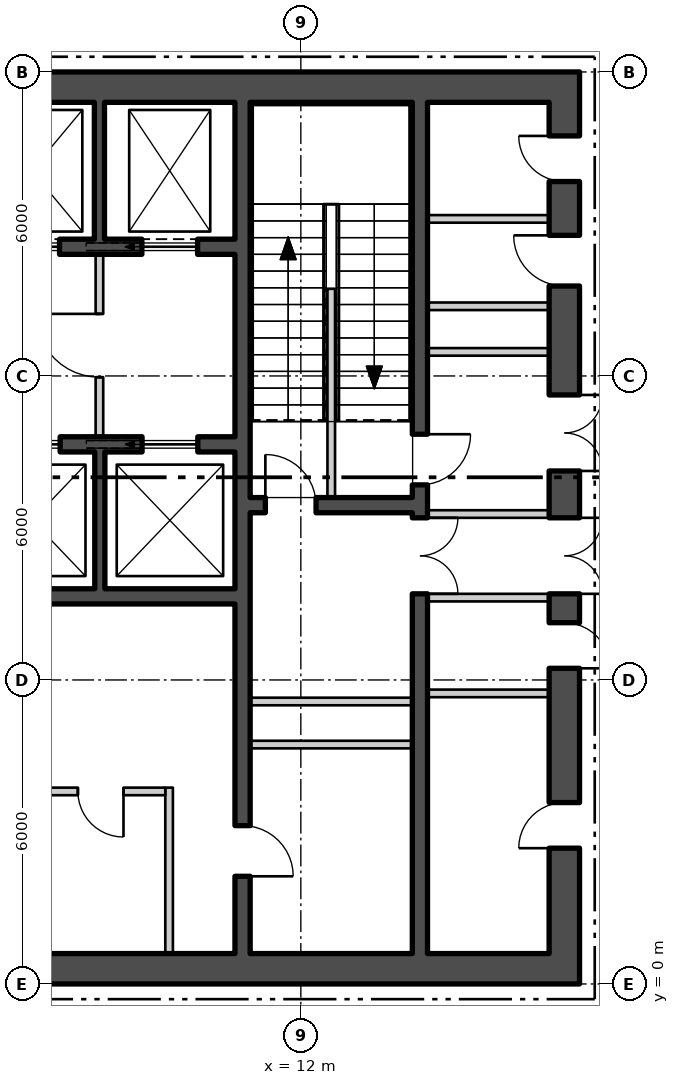
"""IFC4 building model, lengths in metres.
Left out: names, types, materials, properties, quantities, classifications, styles, units other than length and angle.
Written with IfcOpenShell. Run it as: python <this file> out.ifc"""

import sys

from ifc_helpers import new_model, si_unit, direction, frame, frame_2d, origin, place, context, subcontext, project, spatial, rectangle, extrude, element, fill, save


model = new_model("IFC4")
c1 = context("Model", 3, precision=1e-05, world=origin(), true_north=direction((0.0, 1.0)))
c2 = subcontext(c1, "Body", "Model", "MODEL_VIEW")
j1 = project(units=[si_unit("LENGTHUNIT", "METRE"), si_unit("PLANEANGLEUNIT", "RADIAN")], contexts=[c1])
p1 = place(None, origin())
s1 = spatial("IfcSite", under=j1, at=p1, CompositionType="ELEMENT")
p2 = place(p1, origin())
s2 = spatial("IfcBuilding", under=s1, at=p2, CompositionType="ELEMENT")
p3 = place(p2, origin())
s3 = spatial("IfcBuildingStorey", under=s2, at=p3, CompositionType="ELEMENT", Elevation=0.0)
p4 = place(p3, frame((-17.5, 0.3, 0.0), z_axis=(0.0, 0.0, 1.0), x_axis=(1.0, 0.0, 0.0)))
e1 = element("IfcWall", 1, at=p4, inside=s3, PredefinedType="SHEAR", context=c2, shape_type="SweptSolid", body=[
    extrude(rectangle(XDim=35.0, YDim=0.6, at=frame_2d((17.5, 0.0))), origin(), (0.0, 0.0, 1.0), 8.18),
])
p5 = place(p4, frame((12.0, 0.0, 0.0)))
e2 = element("IfcOpeningElement", 2, at=p5, cuts=e1, PredefinedType="OPENING", context=c2, shape_type="SweptSolid", body=[
    extrude(rectangle(XDim=1.8, YDim=2.4, at=frame_2d((0.9, 1.2))), frame((0.0, 0.31, 0.0), z_axis=(0.0, -1.0, 0.0), x_axis=(1.0, 0.0, 0.0)), (0.0, 0.0, 1.0), 0.62),
])
p6 = place(p4, frame((22.0, 0.0, 0.0)))
e3 = element("IfcOpeningElement", 3, at=p6, cuts=e1, PredefinedType="OPENING", context=c2, shape_type="SweptSolid", body=[
    extrude(rectangle(XDim=1.8, YDim=2.4, at=frame_2d((0.9, 1.2))), frame((0.0, 0.31, 0.0), z_axis=(0.0, -1.0, 0.0), x_axis=(1.0, 0.0, 0.0)), (0.0, 0.0, 1.0), 0.62),
])
p7 = place(p3, frame((-17.5, 17.7, 0.0), z_axis=(0.0, 0.0, 1.0), x_axis=(1.0, 0.0, 0.0)))
e4 = element("IfcWall", 4, at=p7, inside=s3, PredefinedType="SHEAR", context=c2, shape_type="SweptSolid", body=[
    extrude(rectangle(XDim=35.0, YDim=0.6, at=frame_2d((17.5, 0.0))), origin(), (0.0, 0.0, 1.0), 8.18),
])
p8 = place(p3, frame((17.2, 0.6, 0.0), z_axis=(0.0, 0.0, 1.0), x_axis=(0.0, 1.0, 0.0)))
e5 = element("IfcWall", 5, at=p8, inside=s3, PredefinedType="SHEAR", context=c2, shape_type="SweptSolid", body=[
    extrude(rectangle(XDim=16.8, YDim=0.6, at=frame_2d((8.4, 0.0))), origin(), (0.0, 0.0, 1.0), 8.18),
])
p9 = place(p8, frame((7.1, 0.0, 0.0)))
e6 = element("IfcOpeningElement", 6, at=p9, cuts=e5, PredefinedType="OPENING", context=c2, shape_type="SweptSolid", body=[
    extrude(rectangle(XDim=1.5, YDim=2.4, at=frame_2d((0.75, 1.2))), frame((0.0, 0.31, 0.0), z_axis=(0.0, -1.0, 0.0), x_axis=(1.0, 0.0, 0.0)), (0.0, 0.0, 1.0), 0.62),
])
p10 = place(p8, frame((9.525, 0.0, 0.0)))
e7 = element("IfcOpeningElement", 7, at=p10, cuts=e5, PredefinedType="OPENING", context=c2, shape_type="SweptSolid", body=[
    extrude(rectangle(XDim=1.5, YDim=2.4, at=frame_2d((0.75, 1.2))), frame((0.0, 0.31, 0.0), z_axis=(0.0, -1.0, 0.0), x_axis=(1.0, 0.0, 0.0)), (0.0, 0.0, 1.0), 0.62),
])
p11 = place(p8, frame((2.08, 0.0, 0.0)))
e8 = element("IfcOpeningElement", 8, at=p11, cuts=e5, PredefinedType="OPENING", context=c2, shape_type="SweptSolid", body=[
    extrude(rectangle(XDim=0.9, YDim=2.1, at=frame_2d((0.45, 1.05))), frame((0.0, 0.31, 0.0), z_axis=(0.0, -1.0, 0.0), x_axis=(1.0, 0.0, 0.0)), (0.0, 0.0, 1.0), 0.62),
])
p12 = place(p8, frame((5.63, 0.0, 0.0)))
e9 = element("IfcOpeningElement", 9, at=p12, cuts=e5, PredefinedType="OPENING", context=c2, shape_type="SweptSolid", body=[
    extrude(rectangle(XDim=0.9, YDim=2.1, at=frame_2d((0.45, 1.05))), frame((0.0, 0.31, 0.0), z_axis=(0.0, -1.0, 0.0), x_axis=(1.0, 0.0, 0.0)), (0.0, 0.0, 1.0), 0.62),
])
p13 = place(p8, frame((13.175, 0.0, 0.0)))
e10 = element("IfcOpeningElement", 10, at=p13, cuts=e5, PredefinedType="OPENING", context=c2, shape_type="SweptSolid", body=[
    extrude(rectangle(XDim=1.0, YDim=2.1, at=frame_2d((0.5, 1.05))), frame((0.0, 0.31, 0.0), z_axis=(0.0, -1.0, 0.0), x_axis=(1.0, 0.0, 0.0)), (0.0, 0.0, 1.0), 0.62),
])
p14 = place(p8, frame((15.238, 0.0, 0.0)))
e11 = element("IfcOpeningElement", 11, at=p14, cuts=e5, PredefinedType="OPENING", context=c2, shape_type="SweptSolid", body=[
    extrude(rectangle(XDim=0.9, YDim=2.1, at=frame_2d((0.45, 1.05))), frame((0.0, 0.31, 0.0), z_axis=(0.0, -1.0, 0.0), x_axis=(1.0, 0.0, 0.0)), (0.0, 0.0, 1.0), 0.62),
])
p15 = place(p3, frame((10.85, 0.6, 0.0), z_axis=(0.0, 0.0, 1.0), x_axis=(0.0, 1.0, 0.0)))
e12 = element("IfcWall", 12, at=p15, inside=s3, PredefinedType="SHEAR", context=c2, shape_type="SweptSolid", body=[
    extrude(rectangle(XDim=16.8, YDim=0.3, at=frame_2d((8.4, 0.0))), origin(), (0.0, 0.0, 1.0), 8.18),
])
p16 = place(p15, frame((1.525, 0.0, 0.0)))
e13 = element("IfcOpeningElement", 13, at=p16, cuts=e12, PredefinedType="OPENING", context=c2, shape_type="SweptSolid", body=[
    extrude(rectangle(XDim=1.0, YDim=2.1, at=frame_2d((0.5, 1.05))), frame((0.0, 0.16, 0.0), z_axis=(0.0, -1.0, 0.0), x_axis=(1.0, 0.0, 0.0)), (0.0, 0.0, 1.0), 0.32),
])
p17 = place(p3, frame((14.35, 0.6, 0.0), z_axis=(0.0, 0.0, 1.0), x_axis=(0.0, 1.0, 0.0)))
e14 = element("IfcWall", 14, at=p17, inside=s3, PredefinedType="SHEAR", context=c2, shape_type="SweptSolid", body=[
    extrude(rectangle(XDim=16.8, YDim=0.3, at=frame_2d((8.4, 0.0))), origin(), (0.0, 0.0, 1.0), 8.18),
])
p18 = place(p17, frame((9.25, 0.0, 0.0)))
e15 = element("IfcOpeningElement", 15, at=p18, cuts=e14, PredefinedType="OPENING", context=c2, shape_type="SweptSolid", body=[
    extrude(rectangle(XDim=1.0, YDim=2.1, at=frame_2d((0.5, 1.05))), frame((0.0, 0.16, 0.0), z_axis=(0.0, -1.0, 0.0), x_axis=(1.0, 0.0, 0.0)), (0.0, 0.0, 1.0), 0.32),
])
p19 = place(p17, frame((7.1, 0.0, 0.0)))
e16 = element("IfcOpeningElement", 16, at=p19, cuts=e14, PredefinedType="OPENING", context=c2, shape_type="SweptSolid", body=[
    extrude(rectangle(XDim=1.5, YDim=2.4, at=frame_2d((0.75, 1.2))), frame((0.0, 0.16, 0.0), z_axis=(0.0, -1.0, 0.0), x_axis=(1.0, 0.0, 0.0)), (0.0, 0.0, 1.0), 0.32),
])
p20 = place(p3, frame((11.0, 9.45, 0.0), z_axis=(0.0, 0.0, 1.0), x_axis=(1.0, 0.0, 0.0)))
e17 = element("IfcWall", 17, at=p20, inside=s3, PredefinedType="SHEAR", context=c2, shape_type="SweptSolid", body=[
    extrude(rectangle(XDim=3.2, YDim=0.3, at=frame_2d((1.6, 0.0))), origin(), (0.0, 0.0, 1.0), 8.18),
])
p21 = place(p20, frame((0.3, 0.0, 0.0)))
e18 = element("IfcOpeningElement", 18, at=p21, cuts=e17, PredefinedType="OPENING", context=c2, shape_type="SweptSolid", body=[
    extrude(rectangle(XDim=1.0, YDim=2.1, at=frame_2d((0.5, 1.05))), frame((0.0, 0.16, 0.0), z_axis=(0.0, -1.0, 0.0), x_axis=(1.0, 0.0, 0.0)), (0.0, 0.0, 1.0), 0.32),
])
p22 = place(p3, frame((-10.7, 14.55, 0.0), z_axis=(0.0, 0.0, 1.0), x_axis=(1.0, 0.0, 0.0)))
e19 = element("IfcWall", 19, at=p22, inside=s3, PredefinedType="SHEAR", context=c2, shape_type="SweptSolid", body=[
    extrude(rectangle(XDim=21.4, YDim=0.3, at=frame_2d((10.7, 0.0))), origin(), (0.0, 0.0, 1.0), 8.18),
])
p23 = place(p22, frame((0.738, 0.0, 0.0)))
e20 = element("IfcOpeningElement", 20, at=p23, cuts=e19, PredefinedType="OPENING", context=c2, shape_type="SweptSolid", body=[
    extrude(rectangle(XDim=1.1, YDim=2.1, at=frame_2d((0.55, 1.05))), frame((0.0, 0.16, 0.0), z_axis=(0.0, -1.0, 0.0), x_axis=(1.0, 0.0, 0.0)), (0.0, 0.0, 1.0), 0.32),
])
p24 = place(p22, frame((3.462, 0.0, 0.0)))
e21 = element("IfcOpeningElement", 21, at=p24, cuts=e19, PredefinedType="OPENING", context=c2, shape_type="SweptSolid", body=[
    extrude(rectangle(XDim=1.1, YDim=2.1, at=frame_2d((0.55, 1.05))), frame((0.0, 0.16, 0.0), z_axis=(0.0, -1.0, 0.0), x_axis=(1.0, 0.0, 0.0)), (0.0, 0.0, 1.0), 0.32),
])
p25 = place(p22, frame((6.138, 0.0, 0.0)))
e22 = element("IfcOpeningElement", 22, at=p25, cuts=e19, PredefinedType="OPENING", context=c2, shape_type="SweptSolid", body=[
    extrude(rectangle(XDim=1.1, YDim=2.1, at=frame_2d((0.55, 1.05))), frame((0.0, 0.16, 0.0), z_axis=(0.0, -1.0, 0.0), x_axis=(1.0, 0.0, 0.0)), (0.0, 0.0, 1.0), 0.32),
])
p26 = place(p22, frame((8.812, 0.0, 0.0)))
e23 = element("IfcOpeningElement", 23, at=p26, cuts=e19, PredefinedType="OPENING", context=c2, shape_type="SweptSolid", body=[
    extrude(rectangle(XDim=1.1, YDim=2.1, at=frame_2d((0.55, 1.05))), frame((0.0, 0.16, 0.0), z_axis=(0.0, -1.0, 0.0), x_axis=(1.0, 0.0, 0.0)), (0.0, 0.0, 1.0), 0.32),
])
p27 = place(p22, frame((11.488, 0.0, 0.0)))
e24 = element("IfcOpeningElement", 24, at=p27, cuts=e19, PredefinedType="OPENING", context=c2, shape_type="SweptSolid", body=[
    extrude(rectangle(XDim=1.1, YDim=2.1, at=frame_2d((0.55, 1.05))), frame((0.0, 0.16, 0.0), z_axis=(0.0, -1.0, 0.0), x_axis=(1.0, 0.0, 0.0)), (0.0, 0.0, 1.0), 0.32),
])
p28 = place(p22, frame((14.162, 0.0, 0.0)))
e25 = element("IfcOpeningElement", 25, at=p28, cuts=e19, PredefinedType="OPENING", context=c2, shape_type="SweptSolid", body=[
    extrude(rectangle(XDim=1.1, YDim=2.1, at=frame_2d((0.55, 1.05))), frame((0.0, 0.16, 0.0), z_axis=(0.0, -1.0, 0.0), x_axis=(1.0, 0.0, 0.0)), (0.0, 0.0, 1.0), 0.32),
])
p29 = place(p22, frame((16.837, 0.0, 0.0)))
e26 = element("IfcOpeningElement", 26, at=p29, cuts=e19, PredefinedType="OPENING", context=c2, shape_type="SweptSolid", body=[
    extrude(rectangle(XDim=1.1, YDim=2.1, at=frame_2d((0.55, 1.05))), frame((0.0, 0.16, 0.0), z_axis=(0.0, -1.0, 0.0), x_axis=(1.0, 0.0, 0.0)), (0.0, 0.0, 1.0), 0.32),
])
p30 = place(p22, frame((19.562, 0.0, 0.0)))
e27 = element("IfcOpeningElement", 27, at=p30, cuts=e19, PredefinedType="OPENING", context=c2, shape_type="SweptSolid", body=[
    extrude(rectangle(XDim=1.1, YDim=2.1, at=frame_2d((0.55, 1.05))), frame((0.0, 0.16, 0.0), z_axis=(0.0, -1.0, 0.0), x_axis=(1.0, 0.0, 0.0)), (0.0, 0.0, 1.0), 0.32),
])
p31 = place(p3, frame((2.6, 10.65, 0.0), z_axis=(0.0, 0.0, 1.0), x_axis=(1.0, 0.0, 0.0)))
e28 = element("IfcWall", 28, at=p31, inside=s3, PredefinedType="SHEAR", context=c2, shape_type="SweptSolid", body=[
    extrude(rectangle(XDim=8.1, YDim=0.3, at=frame_2d((4.05, 0.0))), origin(), (0.0, 0.0, 1.0), 8.18),
])
p32 = place(p31, frame((0.883, 0.0, 0.0)))
e29 = element("IfcOpeningElement", 29, at=p32, cuts=e28, PredefinedType="OPENING", context=c2, shape_type="SweptSolid", body=[
    extrude(rectangle(XDim=1.1, YDim=2.1, at=frame_2d((0.55, 1.05))), frame((0.0, 0.16, 0.0), z_axis=(0.0, -1.0, 0.0), x_axis=(1.0, 0.0, 0.0)), (0.0, 0.0, 1.0), 0.32),
])
p33 = place(p31, frame((3.55, 0.0, 0.0)))
e30 = element("IfcOpeningElement", 30, at=p33, cuts=e28, PredefinedType="OPENING", context=c2, shape_type="SweptSolid", body=[
    extrude(rectangle(XDim=1.1, YDim=2.1, at=frame_2d((0.55, 1.05))), frame((0.0, 0.16, 0.0), z_axis=(0.0, -1.0, 0.0), x_axis=(1.0, 0.0, 0.0)), (0.0, 0.0, 1.0), 0.32),
])
p34 = place(p31, frame((6.267, 0.0, 0.0)))
e31 = element("IfcOpeningElement", 31, at=p34, cuts=e28, PredefinedType="OPENING", context=c2, shape_type="SweptSolid", body=[
    extrude(rectangle(XDim=1.1, YDim=2.1, at=frame_2d((0.55, 1.05))), frame((0.0, 0.16, 0.0), z_axis=(0.0, -1.0, 0.0), x_axis=(1.0, 0.0, 0.0)), (0.0, 0.0, 1.0), 0.32),
])
p35 = place(p3, frame((2.6, 7.65, 0.0), z_axis=(0.0, 0.0, 1.0), x_axis=(1.0, 0.0, 0.0)))
e32 = element("IfcWall", 32, at=p35, inside=s3, PredefinedType="SHEAR", context=c2, shape_type="SweptSolid", body=[
    extrude(rectangle(XDim=8.1, YDim=0.3, at=frame_2d((4.05, 0.0))), origin(), (0.0, 0.0, 1.0), 8.18),
])
for number, where, z_axis, x_axis in (
    (33, (8.025, 14.7, 0.0), (0.0, 0.0, 1.0), (0.0, 1.0, 0.0)),
    (34, (8.033, 7.8, 0.0), (0.0, 0.0, 1.0), (0.0, 1.0, 0.0)),
):
    element("IfcWall", number, at=place(p3, frame(where, z_axis=z_axis, x_axis=x_axis)), inside=s3, PredefinedType="SHEAR", context=c2, shape_type="SweptSolid", body=[
        extrude(rectangle(XDim=2.7, YDim=0.2, at=frame_2d((1.35, 0.0))), origin(), (0.0, 0.0, 1.0), 8.18),
    ])
p36 = place(p3, frame((8.025, 10.8, 0.0), z_axis=(0.0, 0.0, 1.0), x_axis=(0.0, 1.0, 0.0)))
e35 = element("IfcWall", 35, at=p36, inside=s3, PredefinedType="PARTITIONING", context=c2, shape_type="SweptSolid", body=[
    extrude(rectangle(XDim=3.6, YDim=0.15, at=frame_2d((1.8, 0.0))), origin(), (0.0, 0.0, 1.0), 8.18),
])
p37 = place(p36, frame((1.175, 0.0, 0.0)))
e36 = element("IfcOpeningElement", 36, at=p37, cuts=e35, PredefinedType="OPENING", context=c2, shape_type="SweptSolid", body=[
    extrude(rectangle(XDim=1.25, YDim=2.1, at=frame_2d((0.625, 1.05))), frame((0.0, 0.085, 0.0), z_axis=(0.0, -1.0, 0.0), x_axis=(1.0, 0.0, 0.0)), (0.0, 0.0, 1.0), 0.17),
])
p38 = place(p3, frame((12.6, 9.6, 0.0), z_axis=(0.0, 0.0, 1.0), x_axis=(0.0, 1.0, 0.0)))
e37 = element("IfcWall", 37, at=p38, inside=s3, PredefinedType="PARTITIONING", context=c2, shape_type="SweptSolid", body=[
    extrude(rectangle(XDim=1.26, YDim=0.15, at=frame_2d((0.63, 0.0))), origin(), (0.0, 0.0, 1.0), 4.0),
])
p39 = place(p3, frame((12.6, 10.86, 0.0), z_axis=(0.0, 0.0, 1.0), x_axis=(0.0, 1.0, 0.0)))
e38 = element("IfcWall", 38, at=p39, inside=s3, PredefinedType="PARTITIONING", context=c2, shape_type="SweptSolid", body=[
    extrude(rectangle(XDim=0.24, YDim=0.15, at=frame_2d((0.12, 0.0))), origin(), (0.0, 0.0, 1.0), 3.77),
])
p40 = place(p3, frame((12.6, 11.1, 0.0), z_axis=(0.0, 0.0, 1.0), x_axis=(0.0, 1.0, 0.0)))
e39 = element("IfcWall", 39, at=p40, inside=s3, PredefinedType="PARTITIONING", context=c2, shape_type="SweptSolid", body=[
    extrude(rectangle(XDim=2.62, YDim=0.15, at=frame_2d((1.31, 0.0))), origin(), (0.0, 0.0, 1.0), 4.0),
])
for number, where, z_axis, x_axis in (
    (40, (11.0, 5.575, 0.0), (0.0, 0.0, 1.0), (1.0, 0.0, 0.0)),
    (41, (11.0, 4.725, 0.0), (0.0, 0.0, 1.0), (1.0, 0.0, 0.0)),
):
    element("IfcWall", number, at=place(p3, frame(where, z_axis=z_axis, x_axis=x_axis)), inside=s3, PredefinedType="PARTITIONING", context=c2, shape_type="SweptSolid", body=[
        extrude(rectangle(XDim=3.2, YDim=0.15, at=frame_2d((1.6, 0.0))), origin(), (0.0, 0.0, 1.0), 8.18),
    ])
for number, where, z_axis, x_axis in (
    (42, (14.5, 7.625, 0.0), (0.0, 0.0, 1.0), (1.0, 0.0, 0.0)),
    (43, (14.5, 9.275, 0.0), (0.0, 0.0, 1.0), (1.0, 0.0, 0.0)),
    (44, (14.5, 12.475, 0.0), (0.0, 0.0, 1.0), (1.0, 0.0, 0.0)),
    (45, (14.5, 13.375, 0.0), (0.0, 0.0, 1.0), (1.0, 0.0, 0.0)),
    (46, (14.5, 5.735, 0.0), (0.0, 0.0, 1.0), (1.0, 0.0, 0.0)),
    (47, (14.5, 15.1, 0.0), (0.0, 0.0, 1.0), (1.0, 0.0, 0.0)),
):
    element("IfcWall", number, at=place(p3, frame(where, z_axis=z_axis, x_axis=x_axis)), inside=s3, PredefinedType="PARTITIONING", context=c2, shape_type="SweptSolid", body=[
        extrude(rectangle(XDim=2.4, YDim=0.15, at=frame_2d((1.2, 0.0))), origin(), (0.0, 0.0, 1.0), 8.18),
    ])
p41 = place(p3, frame((9.4, 0.6, 0.0), z_axis=(0.0, 0.0, 1.0), x_axis=(0.0, 1.0, 0.0)))
e48 = element("IfcWall", 48, at=p41, inside=s3, PredefinedType="PARTITIONING", context=c2, shape_type="SweptSolid", body=[
    extrude(rectangle(XDim=3.275, YDim=0.15, at=frame_2d((1.637, 0.0))), origin(), (0.0, 0.0, 1.0), 8.18),
])
p42 = place(p3, frame((6.775, 3.8, 0.0), z_axis=(0.0, 0.0, 1.0), x_axis=(1.0, 0.0, 0.0)))
e49 = element("IfcWall", 49, at=p42, inside=s3, PredefinedType="PARTITIONING", context=c2, shape_type="SweptSolid", body=[
    extrude(rectangle(XDim=2.55, YDim=0.15, at=frame_2d((1.275, 0.0))), origin(), (0.0, 0.0, 1.0), 8.18),
])
p43 = place(p42, frame((0.825, 0.0, 0.0)))
e50 = element("IfcOpeningElement", 50, at=p43, cuts=e49, PredefinedType="OPENING", context=c2, shape_type="SweptSolid", body=[
    extrude(rectangle(XDim=0.9, YDim=2.1, at=frame_2d((0.45, 1.05))), frame((0.0, 0.085, 0.0), z_axis=(0.0, -1.0, 0.0), x_axis=(1.0, 0.0, 0.0)), (0.0, 0.0, 1.0), 0.17),
])
p44 = place(p29, origin())
e51 = element("IfcDoor", 51, at=p44, inside=s3, OperationType="SLIDING_TO_LEFT", PredefinedType="DOOR", context=c2, shape_type="SweptSolid", body=[
    extrude(rectangle(XDim=1.1, YDim=2.1, at=frame_2d((0.55, 1.05))), frame((0.0, 0.025, 0.0), z_axis=(0.0, -1.0, 0.0), x_axis=(1.0, 0.0, 0.0)), (0.0, 0.0, 1.0), 0.05),
])
fill(e26, e51)
p45 = place(p30, origin())
e52 = element("IfcDoor", 52, at=p45, inside=s3, OperationType="SLIDING_TO_LEFT", PredefinedType="DOOR", context=c2, shape_type="SweptSolid", body=[
    extrude(rectangle(XDim=1.1, YDim=2.1, at=frame_2d((0.55, 1.05))), frame((0.0, 0.025, 0.0), z_axis=(0.0, -1.0, 0.0), x_axis=(1.0, 0.0, 0.0)), (0.0, 0.0, 1.0), 0.05),
])
fill(e27, e52)
p46 = place(p33, origin())
e53 = element("IfcDoor", 53, at=p46, inside=s3, OperationType="SLIDING_TO_LEFT", PredefinedType="DOOR", context=c2, shape_type="SweptSolid", body=[
    extrude(rectangle(XDim=1.1, YDim=2.1, at=frame_2d((0.55, 1.05))), frame((0.0, 0.025, 0.0), z_axis=(0.0, -1.0, 0.0), x_axis=(1.0, 0.0, 0.0)), (0.0, 0.0, 1.0), 0.05),
])
fill(e30, e53)
p47 = place(p34, origin())
e54 = element("IfcDoor", 54, at=p47, inside=s3, OperationType="SLIDING_TO_LEFT", PredefinedType="DOOR", context=c2, shape_type="SweptSolid", body=[
    extrude(rectangle(XDim=1.1, YDim=2.1, at=frame_2d((0.55, 1.05))), frame((0.0, 0.025, 0.0), z_axis=(0.0, -1.0, 0.0), x_axis=(1.0, 0.0, 0.0)), (0.0, 0.0, 1.0), 0.05),
])
fill(e31, e54)
p48 = place(p37, origin())
e55 = element("IfcDoor", 55, at=p48, inside=s3, OperationType="SINGLE_SWING_LEFT", PredefinedType="DOOR", context=c2, shape_type="SweptSolid", body=[
    extrude(rectangle(XDim=1.25, YDim=2.1, at=frame_2d((0.625, 1.05))), frame((0.0, 0.025, 0.0), z_axis=(0.0, -1.0, 0.0), x_axis=(1.0, 0.0, 0.0)), (0.0, 0.0, 1.0), 0.05),
])
fill(e36, e55)
p49 = place(p21, origin())
e56 = element("IfcDoor", 56, at=p49, inside=s3, OperationType="SINGLE_SWING_RIGHT", PredefinedType="DOOR", context=c2, shape_type="SweptSolid", body=[
    extrude(rectangle(XDim=1.0, YDim=2.1, at=frame_2d((0.5, 1.05))), frame((0.0, 0.025, 0.0), z_axis=(0.0, -1.0, 0.0), x_axis=(1.0, 0.0, 0.0)), (0.0, 0.0, 1.0), 0.05),
])
fill(e18, e56)
p50 = place(p18, origin())
e57 = element("IfcDoor", 57, at=p50, inside=s3, OperationType="SINGLE_SWING_RIGHT", PredefinedType="DOOR", context=c2, shape_type="SweptSolid", body=[
    extrude(rectangle(XDim=1.0, YDim=2.1, at=frame_2d((0.5, 1.05))), frame((0.0, 0.025, 0.0), z_axis=(0.0, -1.0, 0.0), x_axis=(1.0, 0.0, 0.0)), (0.0, 0.0, 1.0), 0.05),
])
fill(e15, e57)
p51 = place(p16, origin())
e58 = element("IfcDoor", 58, at=p51, inside=s3, OperationType="SINGLE_SWING_LEFT", PredefinedType="DOOR", context=c2, shape_type="SweptSolid", body=[
    extrude(rectangle(XDim=1.0, YDim=2.1, at=frame_2d((0.5, 1.05))), frame((0.0, 0.025, 0.0), z_axis=(0.0, -1.0, 0.0), x_axis=(1.0, 0.0, 0.0)), (0.0, 0.0, 1.0), 0.05),
])
fill(e13, e58)
p52 = place(p19, origin())
e59 = element("IfcDoor", 59, at=p52, inside=s3, OperationType="DOUBLE_DOOR_SINGLE_SWING", PredefinedType="DOOR", context=c2, shape_type="SweptSolid", body=[
    extrude(rectangle(XDim=1.5, YDim=2.4, at=frame_2d((0.75, 1.2))), frame((0.0, 0.025, 0.0), z_axis=(0.0, -1.0, 0.0), x_axis=(1.0, 0.0, 0.0)), (0.0, 0.0, 1.0), 0.05),
])
fill(e16, e59)
p53 = place(p9, origin())
e60 = element("IfcDoor", 60, at=p53, inside=s3, OperationType="DOUBLE_DOOR_SINGLE_SWING", PredefinedType="DOOR", context=c2, shape_type="SweptSolid", body=[
    extrude(rectangle(XDim=1.5, YDim=2.4, at=frame_2d((0.75, 1.2))), frame((0.0, 0.025, 0.0), z_axis=(0.0, -1.0, 0.0), x_axis=(1.0, 0.0, 0.0)), (0.0, 0.0, 1.0), 0.05),
])
fill(e6, e60)
p54 = place(p10, origin())
e61 = element("IfcDoor", 61, at=p54, inside=s3, OperationType="DOUBLE_DOOR_SINGLE_SWING", PredefinedType="DOOR", context=c2, shape_type="SweptSolid", body=[
    extrude(rectangle(XDim=1.5, YDim=2.4, at=frame_2d((0.75, 1.2))), frame((0.0, 0.025, 0.0), z_axis=(0.0, -1.0, 0.0), x_axis=(1.0, 0.0, 0.0)), (0.0, 0.0, 1.0), 0.05),
])
fill(e7, e61)
p55 = place(p11, origin())
e62 = element("IfcDoor", 62, at=p55, inside=s3, OperationType="SINGLE_SWING_RIGHT", PredefinedType="DOOR", context=c2, shape_type="SweptSolid", body=[
    extrude(rectangle(XDim=0.9, YDim=2.1, at=frame_2d((0.45, 1.05))), frame((0.0, 0.025, 0.0), z_axis=(0.0, -1.0, 0.0), x_axis=(1.0, 0.0, 0.0)), (0.0, 0.0, 1.0), 0.05),
])
fill(e8, e62)
p56 = place(p12, origin())
e63 = element("IfcDoor", 63, at=p56, inside=s3, OperationType="SINGLE_SWING_LEFT", PredefinedType="DOOR", context=c2, shape_type="SweptSolid", body=[
    extrude(rectangle(XDim=0.9, YDim=2.1, at=frame_2d((0.45, 1.05))), frame((0.0, 0.025, 0.0), z_axis=(0.0, -1.0, 0.0), x_axis=(1.0, 0.0, 0.0)), (0.0, 0.0, 1.0), 0.05),
])
fill(e9, e63)
p57 = place(p13, origin())
e64 = element("IfcDoor", 64, at=p57, inside=s3, OperationType="SINGLE_SWING_LEFT", PredefinedType="DOOR", context=c2, shape_type="SweptSolid", body=[
    extrude(rectangle(XDim=1.0, YDim=2.1, at=frame_2d((0.5, 1.05))), frame((0.0, 0.025, 0.0), z_axis=(0.0, -1.0, 0.0), x_axis=(1.0, 0.0, 0.0)), (0.0, 0.0, 1.0), 0.05),
])
fill(e10, e64)
p58 = place(p14, origin())
e65 = element("IfcDoor", 65, at=p58, inside=s3, OperationType="SINGLE_SWING_LEFT", PredefinedType="DOOR", context=c2, shape_type="SweptSolid", body=[
    extrude(rectangle(XDim=0.9, YDim=2.1, at=frame_2d((0.45, 1.05))), frame((0.0, 0.025, 0.0), z_axis=(0.0, -1.0, 0.0), x_axis=(1.0, 0.0, 0.0)), (0.0, 0.0, 1.0), 0.05),
])
fill(e11, e65)
p59 = place(p43, origin())
e66 = element("IfcDoor", 66, at=p59, inside=s3, OperationType="SINGLE_SWING_RIGHT", PredefinedType="DOOR", context=c2, shape_type="SweptSolid", body=[
    extrude(rectangle(XDim=0.9, YDim=2.1, at=frame_2d((0.45, 1.05))), frame((0.0, 0.025, 0.0), z_axis=(0.0, -1.0, 0.0), x_axis=(1.0, 0.0, 0.0)), (0.0, 0.0, 1.0), 0.05),
])
fill(e50, e66)
save(model, sys.argv[1])
